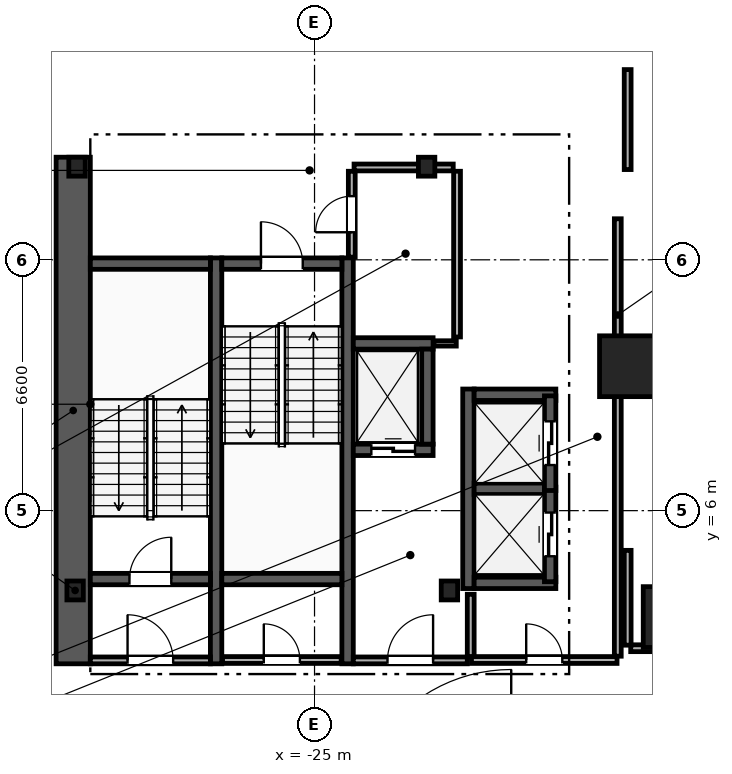
"""IFC4 building model, lengths in metres.
Left out: names, types, materials, properties, quantities, classifications, styles, units other than length and angle.
Written with IfcOpenShell. Run it as: python <this file> out.ifc"""

import sys

from ifc_helpers import new_model, si_unit, direction, frame, frame_2d, origin, origin_2d, place, context, subcontext, project, spatial, rectangle, i_section, extrude, element, fill, save


model = new_model("IFC4")
c1 = context("Model", 3, precision=1e-05, world=origin(), true_north=direction((0.0, 1.0)))
c2 = subcontext(c1, "Body", "Model", "MODEL_VIEW")
j1 = project(units=[si_unit("LENGTHUNIT", "METRE"), si_unit("PLANEANGLEUNIT", "RADIAN")], contexts=[c1])
p1 = place(None, origin())
s1 = spatial("IfcSite", under=j1, at=p1, CompositionType="ELEMENT")
p2 = place(p1, origin())
s2 = spatial("IfcBuilding", under=s1, at=p2, CompositionType="ELEMENT")
p3 = place(p2, frame((0.0, 0.0, -9.0)))
s3 = spatial("IfcBuildingStorey", under=s2, at=p3, CompositionType="ELEMENT", Elevation=-9.0)
for number, where, z_axis, x_axis in (
    (1, (-31.3, 3.9, 0.0), (0.0, 0.0, 1.0), (1.0, 0.0, 0.0)),
    (2, (-21.45, 3.9, 0.0), (0.0, 0.0, 1.0), (1.0, 0.0, 0.0)),
    (3, (-22.05, 15.05, 0.0), (0.0, 0.0, 1.0), (1.0, 0.0, 0.0)),
    (4, (-31.25, 15.05, 0.0), (0.0, 0.0, 1.0), (1.0, 0.0, 0.0)),
):
    element("IfcColumn", number, at=place(p3, frame(where, z_axis=z_axis, x_axis=x_axis)), inside=s3, PredefinedType="COLUMN", context=c2, shape_type="SweptSolid", body=[
        extrude(i_section(OverallWidth=0.432, OverallDepth=0.498, WebThickness=0.056, FlangeThickness=0.089, FilletRadius=0.018, at=origin_2d()), origin(), (0.0, 0.0, 1.0), 4.5),
    ])
for number, where, z_axis, x_axis in (
    (5, (-15.55, 3.2, 0.0), (0.0, 0.0, 1.0), (1.0, 0.0, 0.0)),
    (6, (-16.7, 9.8, 0.0), (0.0, 0.0, 1.0), (1.0, 0.0, 0.0)),
):
    element("IfcColumn", number, at=place(p3, frame(where, z_axis=z_axis, x_axis=x_axis)), inside=s3, PredefinedType="COLUMN", context=c2, shape_type="SweptSolid", body=[
        extrude(rectangle(XDim=1.6, YDim=1.6, at=origin_2d()), origin(), (0.0, 0.0, 1.0), 4.5),
    ])
p4 = place(p3, frame((-31.35, 1.97, 0.0), z_axis=(0.0, 0.0, 1.0), x_axis=(0.0, 1.0, 0.0)))
e7 = element("IfcWall", 7, at=p4, inside=s3, PredefinedType="SHEAR", context=c2, shape_type="SweptSolid", body=[
    extrude(rectangle(XDim=13.33, YDim=0.9, at=frame_2d((6.665, 0.0))), origin(), (0.0, 0.0, 1.0), 4.15),
])
for number, where, z_axis, x_axis in (
    (8, (-27.59, 1.97, 0.0), (0.0, 0.0, 1.0), (0.0, 1.0, 0.0)),
    (9, (-24.13, 1.97, 0.0), (0.0, 0.0, 1.0), (0.0, 1.0, 0.0)),
):
    element("IfcWall", number, at=place(p3, frame(where, z_axis=z_axis, x_axis=x_axis)), inside=s3, PredefinedType="SHEAR", context=c2, shape_type="SweptSolid", body=[
        extrude(rectangle(XDim=10.68, YDim=0.3, at=frame_2d((5.34, 0.0))), origin(), (0.0, 0.0, 1.0), 4.15),
    ])
p5 = place(p3, frame((-30.9, 4.2, 0.0), z_axis=(0.0, 0.0, 1.0), x_axis=(1.0, 0.0, 0.0)))
e10 = element("IfcWall", 10, at=p5, inside=s3, PredefinedType="SHEAR", context=c2, shape_type="SweptSolid", body=[
    extrude(rectangle(XDim=3.16, YDim=0.3, at=frame_2d((1.58, 0.0))), origin(), (0.0, 0.0, 1.0), 4.15),
])
p6 = place(p5, frame((1.03, 0.0, 0.0)))
e11 = element("IfcOpeningElement", 11, at=p6, cuts=e10, PredefinedType="OPENING", context=c2, shape_type="SweptSolid", body=[
    extrude(rectangle(XDim=1.1, YDim=2.15, at=frame_2d((0.55, 1.075))), frame((0.0, 0.16, 0.0), z_axis=(0.0, -1.0, 0.0), x_axis=(1.0, 0.0, 0.0)), (0.0, 0.0, 1.0), 0.32),
])
p7 = place(p3, frame((-30.9, 12.5, 0.0), z_axis=(0.0, 0.0, 1.0), x_axis=(1.0, 0.0, 0.0)))
e12 = element("IfcWall", 12, at=p7, inside=s3, PredefinedType="SHEAR", context=c2, shape_type="SweptSolid", body=[
    extrude(rectangle(XDim=3.16, YDim=0.3, at=frame_2d((1.58, 0.0))), origin(), (0.0, 0.0, 1.0), 4.15),
])
p8 = place(p3, frame((-27.44, 12.5, 0.0), z_axis=(0.0, 0.0, 1.0), x_axis=(1.0, 0.0, 0.0)))
e13 = element("IfcWall", 13, at=p8, inside=s3, PredefinedType="SHEAR", context=c2, shape_type="SweptSolid", body=[
    extrude(rectangle(XDim=3.16, YDim=0.3, at=frame_2d((1.58, 0.0))), origin(), (0.0, 0.0, 1.0), 4.15),
])
p9 = place(p8, frame((1.03, 0.0, 0.0)))
e14 = element("IfcOpeningElement", 14, at=p9, cuts=e13, PredefinedType="OPENING", context=c2, shape_type="SweptSolid", body=[
    extrude(rectangle(XDim=1.1, YDim=2.15, at=frame_2d((0.55, 1.075))), frame((0.0, 0.16, 0.0), z_axis=(0.0, -1.0, 0.0), x_axis=(1.0, 0.0, 0.0)), (0.0, 0.0, 1.0), 0.32),
])
p10 = place(p3, frame((-27.44, 4.2, 0.0), z_axis=(0.0, 0.0, 1.0), x_axis=(1.0, 0.0, 0.0)))
e15 = element("IfcWall", 15, at=p10, inside=s3, PredefinedType="SHEAR", context=c2, shape_type="SweptSolid", body=[
    extrude(rectangle(XDim=3.16, YDim=0.3, at=frame_2d((1.58, 0.0))), origin(), (0.0, 0.0, 1.0), 4.15),
])
p11 = place(p3, frame((-20.89, 2.15, 0.0), z_axis=(0.0, 0.0, 1.0), x_axis=(0.0, 1.0, 0.0)))
e16 = element("IfcWall", 16, at=p11, inside=s3, PredefinedType="PARTITIONING", context=c2, shape_type="SweptSolid", body=[
    extrude(rectangle(XDim=1.65, YDim=0.18, at=frame_2d((0.825, 0.0))), origin(), (0.0, 0.0, 1.0), 4.15),
])
p12 = place(p3, frame((-23.98, 2.06, 0.0), z_axis=(0.0, 0.0, 1.0), x_axis=(1.0, 0.0, 0.0)))
e17 = element("IfcWall", 17, at=p12, inside=s3, PredefinedType="PARTITIONING", context=c2, shape_type="SweptSolid", body=[
    extrude(rectangle(XDim=3.0, YDim=0.18, at=frame_2d((1.5, 0.0))), origin(), (0.0, 0.0, 1.0), 4.15),
])
p13 = place(p12, frame((0.9, 0.0, 0.0)))
e18 = element("IfcOpeningElement", 18, at=p13, cuts=e17, PredefinedType="OPENING", context=c2, shape_type="SweptSolid", body=[
    extrude(rectangle(XDim=1.2, YDim=2.15, at=frame_2d((0.6, 1.075))), frame((0.0, 0.1, 0.0), z_axis=(0.0, -1.0, 0.0), x_axis=(1.0, 0.0, 0.0)), (0.0, 0.0, 1.0), 0.2),
])
p14 = place(p3, frame((-30.9, 2.06, 0.0), z_axis=(0.0, 0.0, 1.0), x_axis=(1.0, 0.0, 0.0)))
e19 = element("IfcWall", 19, at=p14, inside=s3, PredefinedType="PARTITIONING", context=c2, shape_type="SweptSolid", body=[
    extrude(rectangle(XDim=3.16, YDim=0.18, at=frame_2d((1.58, 0.0))), origin(), (0.0, 0.0, 1.0), 4.15),
])
p15 = place(p14, frame((0.98, 0.0, 0.0)))
e20 = element("IfcOpeningElement", 20, at=p15, cuts=e19, PredefinedType="OPENING", context=c2, shape_type="SweptSolid", body=[
    extrude(rectangle(XDim=1.2, YDim=2.15, at=frame_2d((0.6, 1.075))), frame((0.0, 0.1, 0.0), z_axis=(0.0, -1.0, 0.0), x_axis=(1.0, 0.0, 0.0)), (0.0, 0.0, 1.0), 0.2),
])
p16 = place(p3, frame((-23.98, 7.6, 0.0), z_axis=(0.0, 0.0, 1.0), x_axis=(1.0, 0.0, 0.0)))
e21 = element("IfcWall", 21, at=p16, inside=s3, PredefinedType="SHEAR", context=c2, shape_type="SweptSolid", body=[
    extrude(rectangle(XDim=2.1, YDim=0.3, at=frame_2d((1.05, 0.0))), origin(), (0.0, 0.0, 1.0), 4.15),
])
p17 = place(p16, frame((0.475, 0.0, 0.0)))
e22 = element("IfcOpeningElement", 22, at=p17, cuts=e21, PredefinedType="OPENING", context=c2, shape_type="SweptSolid", body=[
    extrude(rectangle(XDim=1.15, YDim=2.2, at=frame_2d((0.575, 1.1))), frame((0.0, 0.16, 0.0), z_axis=(0.0, -1.0, 0.0), x_axis=(1.0, 0.0, 0.0)), (0.0, 0.0, 1.0), 0.32),
])
p18 = place(p3, frame((-23.98, 10.4, 0.0), z_axis=(0.0, 0.0, 1.0), x_axis=(1.0, 0.0, 0.0)))
e23 = element("IfcWall", 23, at=p18, inside=s3, PredefinedType="SHEAR", context=c2, shape_type="SweptSolid", body=[
    extrude(rectangle(XDim=2.1, YDim=0.3, at=frame_2d((1.05, 0.0))), origin(), (0.0, 0.0, 1.0), 4.15),
])
p19 = place(p3, frame((-22.03, 7.75, 0.0), z_axis=(0.0, 0.0, 1.0), x_axis=(0.0, 1.0, 0.0)))
e24 = element("IfcWall", 24, at=p19, inside=s3, PredefinedType="SHEAR", context=c2, shape_type="SweptSolid", body=[
    extrude(rectangle(XDim=2.5, YDim=0.3, at=frame_2d((1.25, 0.0))), origin(), (0.0, 0.0, 1.0), 4.15),
])
p20 = place(p3, frame((-20.95, 3.95, 0.0), z_axis=(0.0, 0.0, 1.0), x_axis=(0.0, 1.0, 0.0)))
e25 = element("IfcWall", 25, at=p20, inside=s3, PredefinedType="SHEAR", context=c2, shape_type="SweptSolid", body=[
    extrude(rectangle(XDim=5.25, YDim=0.3, at=frame_2d((2.625, 0.0))), origin(), (0.0, 0.0, 1.0), 4.15),
])
for number, where, z_axis, x_axis in (
    (26, (-20.8, 4.1, 0.0), (0.0, 0.0, 1.0), (1.0, 0.0, 0.0)),
    (27, (-20.8, 9.05, 0.0), (0.0, 0.0, 1.0), (1.0, 0.0, 0.0)),
):
    element("IfcWall", number, at=place(p3, frame(where, z_axis=z_axis, x_axis=x_axis)), inside=s3, PredefinedType="SHEAR", context=c2, shape_type="SweptSolid", body=[
        extrude(rectangle(XDim=2.15, YDim=0.3, at=frame_2d((1.075, 0.0))), origin(), (0.0, 0.0, 1.0), 4.15),
    ])
p21 = place(p3, frame((-20.8, 6.575, 0.0), z_axis=(0.0, 0.0, 1.0), x_axis=(1.0, 0.0, 0.0)))
e28 = element("IfcWall", 28, at=p21, inside=s3, PredefinedType="SHEAR", context=c2, shape_type="SweptSolid", body=[
    extrude(rectangle(XDim=1.85, YDim=0.3, at=frame_2d((0.925, 0.0))), origin(), (0.0, 0.0, 1.0), 4.15),
])
p22 = place(p3, frame((-18.8, 4.13, 0.0), z_axis=(0.0, 0.0, 1.0), x_axis=(0.0, 1.0, 0.0)))
e29 = element("IfcWall", 29, at=p22, inside=s3, PredefinedType="SHEAR", context=c2, shape_type="SweptSolid", body=[
    extrude(rectangle(XDim=2.49, YDim=0.3, at=frame_2d((1.245, 0.0))), origin(), (0.0, 0.0, 1.0), 4.15),
])
p23 = place(p22, frame((0.67, 0.0, 0.0)))
e30 = element("IfcOpeningElement", 30, at=p23, cuts=e29, PredefinedType="OPENING", context=c2, shape_type="SweptSolid", body=[
    extrude(rectangle(XDim=1.15, YDim=2.2, at=frame_2d((0.575, 1.1))), frame((0.0, 0.16, 0.0), z_axis=(0.0, -1.0, 0.0), x_axis=(1.0, 0.0, 0.0)), (0.0, 0.0, 1.0), 0.32),
])
p24 = place(p3, frame((-18.8, 6.53, 0.0), z_axis=(0.0, 0.0, 1.0), x_axis=(0.0, 1.0, 0.0)))
e31 = element("IfcWall", 31, at=p24, inside=s3, PredefinedType="SHEAR", context=c2, shape_type="SweptSolid", body=[
    extrude(rectangle(XDim=2.49, YDim=0.3, at=frame_2d((1.245, 0.0))), origin(), (0.0, 0.0, 1.0), 4.15),
])
p25 = place(p24, frame((0.67, 0.0, 0.0)))
e32 = element("IfcOpeningElement", 32, at=p25, cuts=e31, PredefinedType="OPENING", context=c2, shape_type="SweptSolid", body=[
    extrude(rectangle(XDim=1.15, YDim=2.2, at=frame_2d((0.575, 1.1))), frame((0.0, 0.16, 0.0), z_axis=(0.0, -1.0, 0.0), x_axis=(1.0, 0.0, 0.0)), (0.0, 0.0, 1.0), 0.32),
])
p26 = place(p3, frame((-17.02, 2.17, 0.0), z_axis=(0.0, 0.0, 1.0), x_axis=(0.0, 1.0, 0.0)))
e33 = element("IfcWall", 33, at=p26, inside=s3, PredefinedType="PARTITIONING", context=c2, shape_type="SweptSolid", body=[
    extrude(rectangle(XDim=11.51, YDim=0.18, at=frame_2d((5.755, 0.0))), origin(), (0.0, 0.0, 1.0), 4.15),
])
p27 = place(p3, frame((-20.87, 2.07, 0.0), z_axis=(0.0, 0.0, 1.0), x_axis=(1.0, 0.0, 0.0)))
e34 = element("IfcWall", 34, at=p27, inside=s3, PredefinedType="PARTITIONING", context=c2, shape_type="SweptSolid", body=[
    extrude(rectangle(XDim=3.83, YDim=0.18, at=frame_2d((1.915, 0.0))), origin(), (0.0, 0.0, 1.0), 4.15),
])
p28 = place(p27, frame((1.44, 0.0, 0.0)))
e35 = element("IfcOpeningElement", 35, at=p28, cuts=e34, PredefinedType="OPENING", context=c2, shape_type="SweptSolid", body=[
    extrude(rectangle(XDim=0.95, YDim=2.1, at=frame_2d((0.475, 1.05))), frame((0.0, 0.1, 0.0), z_axis=(0.0, -1.0, 0.0), x_axis=(1.0, 0.0, 0.0)), (0.0, 0.0, 1.0), 0.2),
])
p29 = place(p3, frame((-21.86, 10.4, 0.0), z_axis=(0.0, 0.0, 1.0), x_axis=(1.0, 0.0, 0.0)))
e36 = element("IfcWall", 36, at=p29, inside=s3, PredefinedType="PARTITIONING", context=c2, shape_type="SweptSolid", body=[
    extrude(rectangle(XDim=0.59, YDim=0.14, at=frame_2d((0.295, 0.0))), origin(), (0.0, 0.0, 1.0), 4.15),
])
p30 = place(p3, frame((-21.25, 10.57, 0.0), z_axis=(0.0, 0.0, 1.0), x_axis=(0.0, 1.0, 0.0)))
e37 = element("IfcWall", 37, at=p30, inside=s3, PredefinedType="PARTITIONING", context=c2, shape_type="SweptSolid", body=[
    extrude(rectangle(XDim=4.36, YDim=0.18, at=frame_2d((2.18, 0.0))), origin(), (0.0, 0.0, 1.0), 4.15),
])
p31 = place(p3, frame((-23.96, 15.03, 0.0), z_axis=(0.0, 0.0, 1.0), x_axis=(1.0, 0.0, 0.0)))
e38 = element("IfcWall", 38, at=p31, inside=s3, PredefinedType="PARTITIONING", context=c2, shape_type="SweptSolid", body=[
    extrude(rectangle(XDim=2.61, YDim=0.18, at=frame_2d((1.305, 0.0))), origin(), (0.0, 0.0, 1.0), 3.223),
])
p32 = place(p3, frame((-27.42, 2.07, 0.0), z_axis=(0.0, 0.0, 1.0), x_axis=(1.0, 0.0, 0.0)))
e39 = element("IfcWall", 39, at=p32, inside=s3, PredefinedType="PARTITIONING", context=c2, shape_type="SweptSolid", body=[
    extrude(rectangle(XDim=3.12, YDim=0.18, at=frame_2d((1.56, 0.0))), origin(), (0.0, 0.0, 1.0), 4.15),
])
p33 = place(p32, frame((1.085, 0.0, 0.0)))
e40 = element("IfcOpeningElement", 40, at=p33, cuts=e39, PredefinedType="OPENING", context=c2, shape_type="SweptSolid", body=[
    extrude(rectangle(XDim=0.95, YDim=2.1, at=frame_2d((0.475, 1.05))), frame((0.0, 0.1, 0.0), z_axis=(0.0, -1.0, 0.0), x_axis=(1.0, 0.0, 0.0)), (0.0, 0.0, 1.0), 0.2),
])
p34 = place(p3, frame((-24.02, 12.67, 0.0), z_axis=(0.0, 0.0, 1.0), x_axis=(0.0, 1.0, 0.0)))
e41 = element("IfcWall", 41, at=p34, inside=s3, PredefinedType="PARTITIONING", context=c2, shape_type="SweptSolid", body=[
    extrude(rectangle(XDim=2.26, YDim=0.18, at=frame_2d((1.13, 0.0))), origin(), (0.0, 0.0, 1.0), 4.15),
])
p35 = place(p34, frame((0.655, 0.0, 0.0)))
e42 = element("IfcOpeningElement", 42, at=p35, cuts=e41, PredefinedType="OPENING", context=c2, shape_type="SweptSolid", body=[
    extrude(rectangle(XDim=0.95, YDim=2.1, at=frame_2d((0.475, 1.05))), frame((0.0, 0.1, 0.0), z_axis=(0.0, -1.0, 0.0), x_axis=(1.0, 0.0, 0.0)), (0.0, 0.0, 1.0), 0.2),
])
p36 = place(p3, frame((16.68, 2.38, 0.0), z_axis=(0.0, 0.0, 1.0), x_axis=(-1.0, 0.0, 0.0)))
e43 = element("IfcWall", 43, at=p36, inside=s3, PredefinedType="PARTITIONING", context=c2, shape_type="SweptSolid", body=[
    extrude(rectangle(XDim=33.36, YDim=0.18, at=frame_2d((16.68, 0.0))), origin(), (0.0, 0.0, 1.0), 3.377),
])
p37 = place(p36, frame((15.98, 0.0, 0.0)))
e44 = element("IfcOpeningElement", 44, at=p37, cuts=e43, PredefinedType="OPENING", context=c2, shape_type="SweptSolid", body=[
    extrude(rectangle(XDim=1.4, YDim=2.2, at=frame_2d((0.7, 1.1))), frame((0.0, 0.1, 0.0), z_axis=(0.0, -1.0, 0.0), x_axis=(1.0, 0.0, 0.0)), (0.0, 0.0, 1.0), 0.2),
])
p38 = place(p3, frame((-16.76, 14.975, 0.0), z_axis=(0.0, 0.0, 1.0), x_axis=(0.0, 1.0, 0.0)))
e45 = element("IfcWall", 45, at=p38, inside=s3, PredefinedType="PARTITIONING", context=c2, shape_type="SweptSolid", body=[
    extrude(rectangle(XDim=2.631, YDim=0.18, at=frame_2d((1.315, 0.0))), origin(), (0.0, 0.0, 1.0), 4.15),
])
p39 = place(p3, frame((-16.76, 2.46, 0.0), z_axis=(0.0, 0.0, 1.0), x_axis=(0.0, 1.0, 0.0)))
e46 = element("IfcWall", 46, at=p39, inside=s3, PredefinedType="PARTITIONING", context=c2, shape_type="SweptSolid", body=[
    extrude(rectangle(XDim=2.495, YDim=0.18, at=frame_2d((1.248, 0.0))), origin(), (0.0, 0.0, 1.0), 4.15),
])
p40 = place(p6, origin())
e47 = element("IfcDoor", 47, at=p40, inside=s3, OperationType="SINGLE_SWING_RIGHT", PredefinedType="DOOR", context=c2, shape_type="SweptSolid", body=[
    extrude(rectangle(XDim=1.1, YDim=2.15, at=frame_2d((0.55, 1.075))), frame((0.0, 0.025, 0.0), z_axis=(0.0, -1.0, 0.0), x_axis=(1.0, 0.0, 0.0)), (0.0, 0.0, 1.0), 0.05),
])
fill(e11, e47)
p41 = place(p9, origin())
e48 = element("IfcDoor", 48, at=p41, inside=s3, OperationType="SINGLE_SWING_LEFT", PredefinedType="DOOR", context=c2, shape_type="SweptSolid", body=[
    extrude(rectangle(XDim=1.1, YDim=2.15, at=frame_2d((0.55, 1.075))), frame((0.0, 0.025, 0.0), z_axis=(0.0, -1.0, 0.0), x_axis=(1.0, 0.0, 0.0)), (0.0, 0.0, 1.0), 0.05),
])
fill(e14, e48)
p42 = place(p13, origin())
e49 = element("IfcDoor", 49, at=p42, inside=s3, OperationType="SINGLE_SWING_RIGHT", PredefinedType="DOOR", context=c2, shape_type="SweptSolid", body=[
    extrude(rectangle(XDim=1.2, YDim=2.15, at=frame_2d((0.6, 1.075))), frame((0.0, 0.025, 0.0), z_axis=(0.0, -1.0, 0.0), x_axis=(1.0, 0.0, 0.0)), (0.0, 0.0, 1.0), 0.05),
])
fill(e18, e49)
p43 = place(p15, origin())
e50 = element("IfcDoor", 50, at=p43, inside=s3, OperationType="SINGLE_SWING_LEFT", PredefinedType="DOOR", context=c2, shape_type="SweptSolid", body=[
    extrude(rectangle(XDim=1.2, YDim=2.15, at=frame_2d((0.6, 1.075))), frame((0.0, 0.025, 0.0), z_axis=(0.0, -1.0, 0.0), x_axis=(1.0, 0.0, 0.0)), (0.0, 0.0, 1.0), 0.05),
])
fill(e20, e50)
p44 = place(p17, origin())
e51 = element("IfcDoor", 51, at=p44, inside=s3, OperationType="SLIDING_TO_LEFT", PredefinedType="TRAPDOOR", context=c2, shape_type="SweptSolid", body=[
    extrude(rectangle(XDim=1.15, YDim=2.2, at=frame_2d((0.575, 1.1))), frame((0.0, 0.025, 0.0), z_axis=(0.0, -1.0, 0.0), x_axis=(1.0, 0.0, 0.0)), (0.0, 0.0, 1.0), 0.05),
])
fill(e22, e51)
p45 = place(p23, origin())
e52 = element("IfcDoor", 52, at=p45, inside=s3, OperationType="SLIDING_TO_LEFT", PredefinedType="TRAPDOOR", context=c2, shape_type="SweptSolid", body=[
    extrude(rectangle(XDim=1.15, YDim=2.2, at=frame_2d((0.575, 1.1))), frame((0.0, 0.025, 0.0), z_axis=(0.0, -1.0, 0.0), x_axis=(1.0, 0.0, 0.0)), (0.0, 0.0, 1.0), 0.05),
])
fill(e30, e52)
p46 = place(p25, origin())
e53 = element("IfcDoor", 53, at=p46, inside=s3, OperationType="SLIDING_TO_LEFT", PredefinedType="TRAPDOOR", context=c2, shape_type="SweptSolid", body=[
    extrude(rectangle(XDim=1.15, YDim=2.2, at=frame_2d((0.575, 1.1))), frame((0.0, 0.025, 0.0), z_axis=(0.0, -1.0, 0.0), x_axis=(1.0, 0.0, 0.0)), (0.0, 0.0, 1.0), 0.05),
])
fill(e32, e53)
p47 = place(p28, origin())
e54 = element("IfcDoor", 54, at=p47, inside=s3, OperationType="SINGLE_SWING_LEFT", PredefinedType="DOOR", context=c2, shape_type="SweptSolid", body=[
    extrude(rectangle(XDim=0.95, YDim=2.1, at=frame_2d((0.475, 1.05))), frame((0.0, 0.025, 0.0), z_axis=(0.0, -1.0, 0.0), x_axis=(1.0, 0.0, 0.0)), (0.0, 0.0, 1.0), 0.05),
])
fill(e35, e54)
p48 = place(p33, origin())
e55 = element("IfcDoor", 55, at=p48, inside=s3, OperationType="SINGLE_SWING_LEFT", PredefinedType="DOOR", context=c2, shape_type="SweptSolid", body=[
    extrude(rectangle(XDim=0.95, YDim=2.1, at=frame_2d((0.475, 1.05))), frame((0.0, 0.025, 0.0), z_axis=(0.0, -1.0, 0.0), x_axis=(1.0, 0.0, 0.0)), (0.0, 0.0, 1.0), 0.05),
])
fill(e40, e55)
p49 = place(p35, origin())
e56 = element("IfcDoor", 56, at=p49, inside=s3, OperationType="SINGLE_SWING_LEFT", PredefinedType="DOOR", context=c2, shape_type="SweptSolid", body=[
    extrude(rectangle(XDim=0.95, YDim=2.1, at=frame_2d((0.475, 1.05))), frame((0.0, 0.025, 0.0), z_axis=(0.0, -1.0, 0.0), x_axis=(1.0, 0.0, 0.0)), (0.0, 0.0, 1.0), 0.05),
])
fill(e42, e56)
save(model, sys.argv[1])
